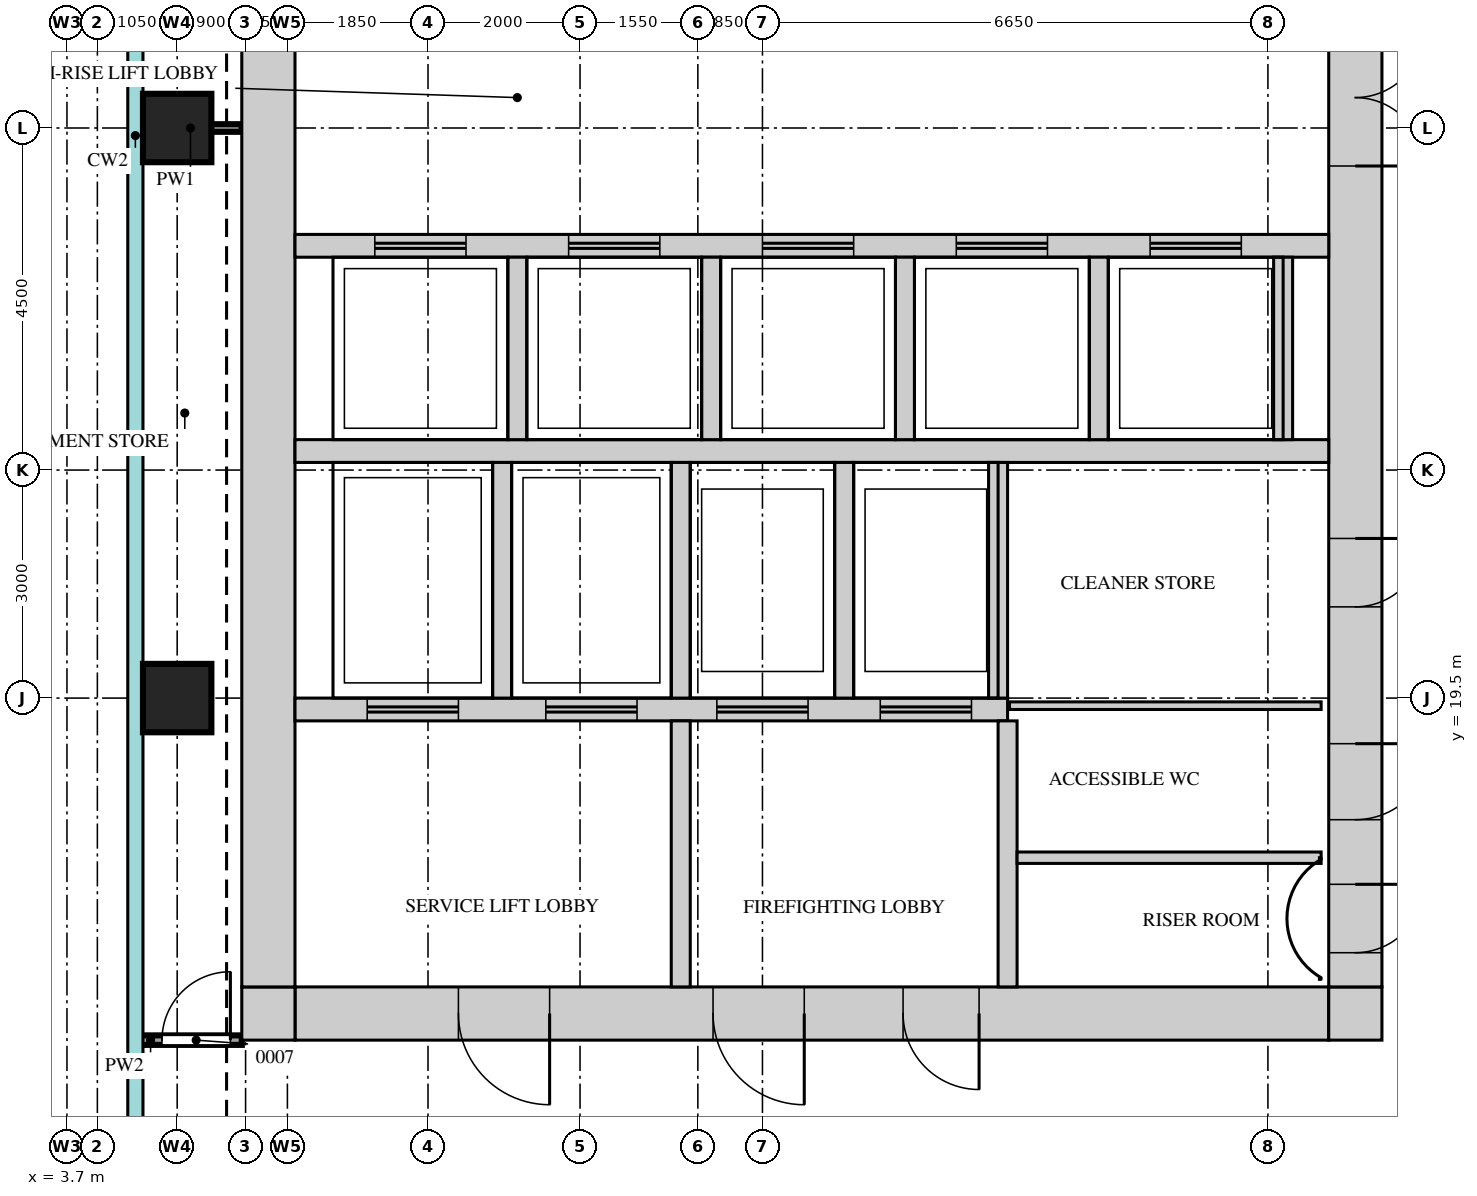
"""IFC4 building model, lengths in metres.
Left out: names, types, materials, properties, quantities, classifications, styles, units other than length and angle.
Written with IfcOpenShell. Run it as: python <this file> out.ifc"""

import sys

from ifc_helpers import new_model, si_unit, direction, frame, frame_2d, origin, origin_2d, place, context, subcontext, project, spatial, rectangle, extrude, source, transform, mapped, element, fill, save


model = new_model("IFC4")
c1 = context("Model", 3, precision=1e-05, world=origin(), true_north=direction((0.0, 1.0)))
c2 = subcontext(c1, "Body", "Model", "MODEL_VIEW")
j1 = project(units=[si_unit("LENGTHUNIT", "METRE"), si_unit("PLANEANGLEUNIT", "RADIAN")], contexts=[c1])
p1 = place(None, origin())
s1 = spatial("IfcSite", under=j1, at=p1, CompositionType="ELEMENT")
p2 = place(p1, origin())
s2 = spatial("IfcBuilding", under=s1, at=p2, CompositionType="ELEMENT")
p3 = place(p2, frame((0.0, 0.0, 242.2)))
s3 = spatial("IfcBuildingStorey", under=s2, at=p3, CompositionType="ELEMENT", Elevation=242.2)
m1 = source(origin(), c2, "Body", "SweptSolid", [
    extrude(rectangle(XDim=13.6, YDim=0.7, at=frame_2d((6.8, 0.0))), origin(), (0.0, 0.0, 1.0), 3.75),
])
p4 = place(p3, frame((6.7, 15.35, 0.0), z_axis=(0.0, 0.0, 1.0), x_axis=(1.0, 0.0, 0.0)))
e1 = element("IfcWall", 1, at=p4, inside=s3, PredefinedType="SHEAR", context=c2, shape_type="MappedRepresentation", body=[
    mapped(m1, transform((0.0, 0.0, 0.0))),
])
m2 = source(origin(), c2, "Body", "SweptSolid", [
    extrude(rectangle(XDim=1.2, YDim=2.1, at=frame_2d((0.6, 1.05))), frame((0.0, 0.36, 0.0), z_axis=(0.0, -1.0, 0.0), x_axis=(1.0, 0.0, 0.0)), (0.0, 0.0, 1.0), 0.72),
])
p5 = place(p4, frame((5.5, 0.0, 0.0)))
e2 = element("IfcOpeningElement", 2, at=p5, cuts=e1, PredefinedType="OPENING", context=c2, shape_type="MappedRepresentation", body=[
    mapped(m2, transform((0.0, 0.0, 0.0))),
])
p6 = place(p4, frame((2.15, 0.0, 0.0)))
e3 = element("IfcOpeningElement", 3, at=p6, cuts=e1, PredefinedType="OPENING", context=c2, shape_type="MappedRepresentation", body=[
    mapped(m2, transform((0.0, 0.0, 0.0))),
])
m3 = source(origin(), c2, "Body", "SweptSolid", [
    extrude(rectangle(XDim=1.0, YDim=2.1, at=frame_2d((0.5, 1.05))), frame((0.0, 0.36, 0.0), z_axis=(0.0, -1.0, 0.0), x_axis=(1.0, 0.0, 0.0)), (0.0, 0.0, 1.0), 0.72),
])
p7 = place(p4, frame((8.0, 0.0, 0.0)))
e4 = element("IfcOpeningElement", 4, at=p7, cuts=e1, PredefinedType="OPENING", context=c2, shape_type="MappedRepresentation", body=[
    mapped(m3, transform((0.0, 0.0, 0.0))),
])
m4 = source(origin(), c2, "Body", "SweptSolid", [
    extrude(rectangle(XDim=0.7, YDim=0.7, at=frame_2d((0.35, 0.0))), origin(), (0.0, 0.0, 1.0), 3.75),
])
for number, where, z_axis, x_axis in (
    (5, (20.3, 15.35, 0.0), (0.0, 0.0, 1.0), (1.0, 0.0, 0.0)),
    (6, (6.0, 15.35, 0.0), (0.0, 0.0, 1.0), (1.0, 0.0, 0.0)),
):
    element("IfcWall", number, at=place(p3, frame(where, z_axis=z_axis, x_axis=x_axis)), inside=s3, PredefinedType="SHEAR", context=c2, shape_type="MappedRepresentation", body=[
        mapped(m4, transform((0.0, 0.0, 0.0))),
    ])
m5 = source(origin(), c2, "Body", "SweptSolid", [
    extrude(rectangle(XDim=22.6, YDim=0.7, at=frame_2d((11.3, 0.0))), origin(), (0.0, 0.0, 1.0), 3.75),
])
p8 = place(p3, frame((20.65, 15.7, 0.0), z_axis=(0.0, 0.0, 1.0), x_axis=(0.0, 1.0, 0.0)))
e7 = element("IfcWall", 7, at=p8, inside=s3, PredefinedType="SHEAR", context=c2, shape_type="MappedRepresentation", body=[
    mapped(m5, transform((0.0, 0.0, 0.0))),
])
m6 = source(origin(), c2, "Body", "SweptSolid", [
    extrude(rectangle(XDim=1.8, YDim=2.1, at=frame_2d((0.9, 1.05))), frame((0.0, 0.36, 0.0), z_axis=(0.0, -1.0, 0.0), x_axis=(1.0, 0.0, 0.0)), (0.0, 0.0, 1.0), 0.72),
])
p9 = place(p8, frame((10.8, 0.0, 0.0)))
e8 = element("IfcOpeningElement", 8, at=p9, cuts=e7, PredefinedType="OPENING", context=c2, shape_type="MappedRepresentation", body=[
    mapped(m6, transform((0.0, 0.0, 0.0))),
])
m7 = source(origin(), c2, "Body", "SweptSolid", [
    extrude(rectangle(XDim=0.9, YDim=2.1, at=frame_2d((0.45, 1.05))), frame((0.0, 0.36, 0.0), z_axis=(0.0, -1.0, 0.0), x_axis=(1.0, 0.0, 0.0)), (0.0, 0.0, 1.0), 0.72),
])
p10 = place(p8, frame((0.45, 0.0, 0.0)))
e9 = element("IfcOpeningElement", 9, at=p10, cuts=e7, PredefinedType="OPENING", context=c2, shape_type="MappedRepresentation", body=[
    mapped(m7, transform((0.0, 0.0, 0.0))),
])
p11 = place(p8, frame((2.2, 0.0, 0.0)))
e10 = element("IfcOpeningElement", 10, at=p11, cuts=e7, PredefinedType="OPENING", context=c2, shape_type="MappedRepresentation", body=[
    mapped(m3, transform((0.0, 0.0, 0.0))),
])
p12 = place(p8, frame((5.0, 0.0, 0.0)))
e11 = element("IfcOpeningElement", 11, at=p12, cuts=e7, PredefinedType="OPENING", context=c2, shape_type="MappedRepresentation", body=[
    mapped(m7, transform((0.0, 0.0, 0.0))),
])
p13 = place(p3, frame((6.35, 15.7, 0.0), z_axis=(0.0, 0.0, 1.0), x_axis=(0.0, 1.0, 0.0)))
e12 = element("IfcWall", 12, at=p13, inside=s3, PredefinedType="SHEAR", context=c2, shape_type="MappedRepresentation", body=[
    mapped(m5, transform((0.0, 0.0, 0.0))),
])
m8 = source(origin(), c2, "Body", "SweptSolid", [
    extrude(rectangle(XDim=13.6, YDim=0.3, at=frame_2d((6.8, 0.0))), origin(), (0.0, 0.0, 1.0), 3.75),
])
p14 = place(p3, frame((6.7, 22.75, 0.0), z_axis=(0.0, 0.0, 1.0), x_axis=(1.0, 0.0, 0.0)))
e13 = element("IfcWall", 13, at=p14, inside=s3, PredefinedType="STANDARD", context=c2, shape_type="MappedRepresentation", body=[
    mapped(m8, transform((0.0, 0.0, 0.0))),
])
m9 = source(origin(), c2, "Body", "SweptSolid", [
    extrude(rectangle(XDim=9.375, YDim=0.3, at=frame_2d((4.688, 0.0))), origin(), (0.0, 0.0, 1.0), 3.75),
])
p15 = place(p3, frame((6.7, 19.35, 0.0), z_axis=(0.0, 0.0, 1.0), x_axis=(1.0, 0.0, 0.0)))
e14 = element("IfcWall", 14, at=p15, inside=s3, PredefinedType="STANDARD", context=c2, shape_type="MappedRepresentation", body=[
    mapped(m9, transform((0.0, 0.0, 0.0))),
])
m10 = source(origin(), c2, "Body", "SweptSolid", [
    extrude(rectangle(XDim=1.2, YDim=2.1, at=frame_2d((0.6, 1.05))), frame((0.0, 0.16, 0.0), z_axis=(0.0, -1.0, 0.0), x_axis=(1.0, 0.0, 0.0)), (0.0, 0.0, 1.0), 0.32),
])
p16 = place(p15, frame((0.95, 0.0, 0.0)))
e15 = element("IfcOpeningElement", 15, at=p16, cuts=e14, PredefinedType="OPENING", context=c2, shape_type="MappedRepresentation", body=[
    mapped(m10, transform((0.0, 0.0, 0.0))),
])
p17 = place(p15, frame((3.3, 0.0, 0.0)))
e16 = element("IfcOpeningElement", 16, at=p17, cuts=e14, PredefinedType="OPENING", context=c2, shape_type="MappedRepresentation", body=[
    mapped(m10, transform((0.0, 0.0, 0.0))),
])
p18 = place(p15, frame((5.55, 0.0, 0.0)))
e17 = element("IfcOpeningElement", 17, at=p18, cuts=e14, PredefinedType="OPENING", context=c2, shape_type="MappedRepresentation", body=[
    mapped(m10, transform((0.0, 0.0, 0.0))),
])
p19 = place(p15, frame((7.7, 0.0, 0.0)))
e18 = element("IfcOpeningElement", 18, at=p19, cuts=e14, PredefinedType="OPENING", context=c2, shape_type="MappedRepresentation", body=[
    mapped(m10, transform((0.0, 0.0, 0.0))),
])
p20 = place(p3, frame((6.7, 25.45, 0.0), z_axis=(0.0, 0.0, 1.0), x_axis=(1.0, 0.0, 0.0)))
e19 = element("IfcWall", 19, at=p20, inside=s3, PredefinedType="STANDARD", context=c2, shape_type="MappedRepresentation", body=[
    mapped(m8, transform((0.0, 0.0, 0.0))),
])
p21 = place(p20, frame((1.05, 0.0, 0.0)))
e20 = element("IfcOpeningElement", 20, at=p21, cuts=e19, PredefinedType="OPENING", context=c2, shape_type="MappedRepresentation", body=[
    mapped(m10, transform((0.0, 0.0, 0.0))),
])
p22 = place(p20, frame((3.6, 0.0, 0.0)))
e21 = element("IfcOpeningElement", 21, at=p22, cuts=e19, PredefinedType="OPENING", context=c2, shape_type="MappedRepresentation", body=[
    mapped(m10, transform((0.0, 0.0, 0.0))),
])
p23 = place(p20, frame((6.15, 0.0, 0.0)))
e22 = element("IfcOpeningElement", 22, at=p23, cuts=e19, PredefinedType="OPENING", context=c2, shape_type="MappedRepresentation", body=[
    mapped(m10, transform((0.0, 0.0, 0.0))),
])
p24 = place(p20, frame((8.7, 0.0, 0.0)))
e23 = element("IfcOpeningElement", 23, at=p24, cuts=e19, PredefinedType="OPENING", context=c2, shape_type="MappedRepresentation", body=[
    mapped(m10, transform((0.0, 0.0, 0.0))),
])
p25 = place(p20, frame((11.25, 0.0, 0.0)))
e24 = element("IfcOpeningElement", 24, at=p25, cuts=e19, PredefinedType="OPENING", context=c2, shape_type="MappedRepresentation", body=[
    mapped(m10, transform((0.0, 0.0, 0.0))),
])
m11 = source(origin(), c2, "Body", "SweptSolid", [
    extrude(rectangle(XDim=3.1, YDim=0.25, at=frame_2d((1.55, 0.0))), origin(), (0.0, 0.0, 1.0), 3.75),
])
for number, where, z_axis, x_axis in (
    (25, (9.425, 19.5, 0.0), (0.0, 0.0, 1.0), (0.0, 1.0, 0.0)),
    (26, (11.775, 19.5, 0.0), (0.0, 0.0, 1.0), (0.0, 1.0, 0.0)),
    (27, (13.925, 19.5, 0.0), (0.0, 0.0, 1.0), (0.0, 1.0, 0.0)),
    (28, (15.95, 19.5, 0.0), (0.0, 0.0, 1.0), (0.0, 1.0, 0.0)),
):
    element("IfcWall", number, at=place(p3, frame(where, z_axis=z_axis, x_axis=x_axis)), inside=s3, PredefinedType="STANDARD", context=c2, shape_type="MappedRepresentation", body=[
        mapped(m11, transform((0.0, 0.0, 0.0))),
    ])
m12 = source(origin(), c2, "Body", "SweptSolid", [
    extrude(rectangle(XDim=2.4, YDim=0.25, at=frame_2d((1.2, 0.0))), origin(), (0.0, 0.0, 1.0), 3.75),
])
for number, where, z_axis, x_axis in (
    (29, (17.275, 22.9, 0.0), (0.0, 0.0, 1.0), (0.0, 1.0, 0.0)),
    (30, (19.7, 22.9, 0.0), (0.0, 0.0, 1.0), (0.0, 1.0, 0.0)),
    (31, (9.625, 22.9, 0.0), (0.0, 0.0, 1.0), (0.0, 1.0, 0.0)),
    (32, (12.175, 22.9, 0.0), (0.0, 0.0, 1.0), (0.0, 1.0, 0.0)),
    (33, (14.725, 22.9, 0.0), (0.0, 0.0, 1.0), (0.0, 1.0, 0.0)),
):
    element("IfcWall", number, at=place(p3, frame(where, z_axis=z_axis, x_axis=x_axis)), inside=s3, PredefinedType="STANDARD", context=c2, shape_type="MappedRepresentation", body=[
        mapped(m12, transform((0.0, 0.0, 0.0))),
    ])
m13 = source(origin(), c2, "Body", "SweptSolid", [
    extrude(rectangle(XDim=3.5, YDim=0.25, at=frame_2d((1.75, 0.0))), origin(), (0.0, 0.0, 1.0), 3.75),
])
for number, where, z_axis, x_axis in (
    (34, (16.075, 15.7, 0.0), (0.0, 0.0, 1.0), (0.0, 1.0, 0.0)),
    (35, (11.775, 15.7, 0.0), (0.0, 0.0, 1.0), (0.0, 1.0, 0.0)),
):
    element("IfcWall", number, at=place(p3, frame(where, z_axis=z_axis, x_axis=x_axis)), inside=s3, PredefinedType="STANDARD", context=c2, shape_type="MappedRepresentation", body=[
        mapped(m13, transform((0.0, 0.0, 0.0))),
    ])
m14 = source(origin(), c2, "Body", "SweptSolid", [
    extrude(rectangle(XDim=0.9, YDim=0.9, at=origin_2d()), origin(), (0.0, 0.0, 1.0), 3.75),
])
for number, where, z_axis, x_axis in (
    (36, (5.15, 19.5, 0.0), (0.0, 0.0, 1.0), (1.0, 0.0, 0.0)),
    (37, (5.15, 27.0, 0.0), (0.0, 0.0, 1.0), (1.0, 0.0, 0.0)),
):
    element("IfcColumn", number, at=place(p3, frame(where, z_axis=z_axis, x_axis=x_axis)), inside=s3, PredefinedType="COLUMN", context=c2, shape_type="MappedRepresentation", body=[
        mapped(m14, transform((0.0, 0.0, 0.0))),
    ])
m15 = source(origin(), c2, "Body", "SweptSolid", [
    extrude(rectangle(XDim=1.35, YDim=0.125, at=frame_2d((0.675, 0.0))), origin(), (0.0, 0.0, 1.0), 3.8),
])
p26 = place(p3, frame((4.65, 15.0, 0.0), z_axis=(0.0, 0.0, 1.0), x_axis=(1.0, 0.0, 0.0)))
e38 = element("IfcWall", 38, at=p26, inside=s3, PredefinedType="PARTITIONING", context=c2, shape_type="MappedRepresentation", body=[
    mapped(m15, transform((0.0, 0.0, 0.0))),
])
m16 = source(origin(), c2, "Body", "SweptSolid", [
    extrude(rectangle(XDim=0.9, YDim=2.1, at=frame_2d((0.45, 1.05))), frame((0.0, 0.073, 0.0), z_axis=(0.0, -1.0, 0.0), x_axis=(1.0, 0.0, 0.0)), (0.0, 0.0, 1.0), 0.145),
])
p27 = place(p26, frame((0.3, 0.0, 0.0)))
e39 = element("IfcOpeningElement", 39, at=p27, cuts=e38, PredefinedType="OPENING", context=c2, shape_type="MappedRepresentation", body=[
    mapped(m16, transform((0.0, 0.0, 0.0))),
])
m17 = source(origin(), c2, "Body", "SweptSolid", [
    extrude(rectangle(XDim=4.0, YDim=0.15, at=frame_2d((2.0, 0.0))), origin(), (0.0, 0.0, 1.0), 3.8),
])
p28 = place(p3, frame((16.2, 17.4, 0.0), z_axis=(0.0, 0.0, 1.0), x_axis=(1.0, 0.0, 0.0)))
e40 = element("IfcWall", 40, at=p28, inside=s3, PredefinedType="PARTITIONING", context=c2, shape_type="MappedRepresentation", body=[
    mapped(m17, transform((0.0, 0.0, 0.0))),
])
m18 = source(origin(), c2, "Body", "SweptSolid", [
    extrude(rectangle(XDim=4.1, YDim=0.1, at=frame_2d((2.05, 0.0))), origin(), (0.0, 0.0, 1.0), 3.8),
])
p29 = place(p3, frame((16.1, 19.4, 0.0), z_axis=(0.0, 0.0, 1.0), x_axis=(1.0, 0.0, 0.0)))
e41 = element("IfcWall", 41, at=p29, inside=s3, PredefinedType="PARTITIONING", context=c2, shape_type="MappedRepresentation", body=[
    mapped(m18, transform((0.0, 0.0, 0.0))),
])
m19 = source(origin(), c2, "Body", "SweptSolid", [
    extrude(rectangle(XDim=1.35, YDim=0.1, at=frame_2d((0.675, 0.0))), origin(), (0.0, 0.0, 1.0), 3.8),
])
p30 = place(p3, frame((4.65, 27.0, 0.0), z_axis=(0.0, 0.0, 1.0), x_axis=(1.0, 0.0, 0.0)))
e42 = element("IfcWall", 42, at=p30, inside=s3, PredefinedType="PARTITIONING", context=c2, shape_type="MappedRepresentation", body=[
    mapped(m19, transform((0.0, 0.0, 0.0))),
])
m20 = source(origin(), c2, "Body", "SweptSolid", [
    extrude(rectangle(XDim=1.8, YDim=2.1, at=frame_2d((0.9, 1.05))), frame((0.0, 0.3, 0.0), z_axis=(0.0, -1.0, 0.0), x_axis=(1.0, 0.0, 0.0)), (0.0, 0.0, 1.0), 0.6),
])
p31 = place(p9, origin())
e43 = element("IfcDoor", 43, at=p31, inside=s3, OperationType="DOUBLE_DOOR_SINGLE_SWING", PredefinedType="DOOR", context=c2, shape_type="MappedRepresentation", body=[
    mapped(m20, transform((0.0, 0.0, 0.0))),
])
fill(e8, e43)
m21 = source(origin(), c2, "Body", "SweptSolid", [
    extrude(rectangle(XDim=0.9, YDim=2.1, at=frame_2d((0.45, 1.05))), frame((0.0, 0.3, 0.0), z_axis=(0.0, -1.0, 0.0), x_axis=(1.0, 0.0, 0.0)), (0.0, 0.0, 1.0), 0.6),
])
p32 = place(p10, origin())
e44 = element("IfcDoor", 44, at=p32, inside=s3, OperationType="SINGLE_SWING_RIGHT", PredefinedType="DOOR", context=c2, shape_type="MappedRepresentation", body=[
    mapped(m21, transform((0.0, 0.0, 0.0))),
])
fill(e9, e44)
m22 = source(origin(), c2, "Body", "SweptSolid", [
    extrude(rectangle(XDim=1.0, YDim=2.1, at=frame_2d((0.5, 1.05))), frame((0.0, 0.3, 0.0), z_axis=(0.0, -1.0, 0.0), x_axis=(1.0, 0.0, 0.0)), (0.0, 0.0, 1.0), 0.6),
])
p33 = place(p11, origin())
e45 = element("IfcDoor", 45, at=p33, inside=s3, OperationType="SINGLE_SWING_RIGHT", PredefinedType="DOOR", context=c2, shape_type="MappedRepresentation", body=[
    mapped(m22, transform((0.0, 0.0, 0.0))),
])
fill(e10, e45)
p34 = place(p12, origin())
e46 = element("IfcDoor", 46, at=p34, inside=s3, OperationType="SINGLE_SWING_RIGHT", PredefinedType="DOOR", context=c2, shape_type="MappedRepresentation", body=[
    mapped(m21, transform((0.0, 0.0, 0.0))),
])
fill(e11, e46)
m23 = source(origin(), c2, "Body", "SweptSolid", [
    extrude(rectangle(XDim=1.2, YDim=2.1, at=frame_2d((0.6, 1.05))), frame((0.0, 0.3, 0.0), z_axis=(0.0, -1.0, 0.0), x_axis=(1.0, 0.0, 0.0)), (0.0, 0.0, 1.0), 0.6),
])
p35 = place(p5, origin())
e47 = element("IfcDoor", 47, at=p35, inside=s3, OperationType="SINGLE_SWING_RIGHT", PredefinedType="DOOR", context=c2, shape_type="MappedRepresentation", body=[
    mapped(m23, transform((0.0, 0.0, 0.0))),
])
fill(e2, e47)
p36 = place(p6, origin())
e48 = element("IfcDoor", 48, at=p36, inside=s3, OperationType="SINGLE_SWING_RIGHT", PredefinedType="DOOR", context=c2, shape_type="MappedRepresentation", body=[
    mapped(m23, transform((0.0, 0.0, 0.0))),
])
fill(e3, e48)
p37 = place(p7, origin())
e49 = element("IfcDoor", 49, at=p37, inside=s3, OperationType="SINGLE_SWING_RIGHT", PredefinedType="DOOR", context=c2, shape_type="MappedRepresentation", body=[
    mapped(m22, transform((0.0, 0.0, 0.0))),
])
fill(e4, e49)
m24 = source(origin(), c2, "Body", "SweptSolid", [
    extrude(rectangle(XDim=0.9, YDim=2.1, at=frame_2d((0.45, 1.05))), frame((0.0, 0.025, 0.0), z_axis=(0.0, -1.0, 0.0), x_axis=(1.0, 0.0, 0.0)), (0.0, 0.0, 1.0), 0.05),
])
p38 = place(p27, origin())
e50 = element("IfcDoor", 50, at=p38, inside=s3, OperationType="SINGLE_SWING_LEFT", PredefinedType="DOOR", context=c2, shape_type="MappedRepresentation", body=[
    mapped(m24, transform((0.0, 0.0, 0.0))),
])
fill(e39, e50)
m25 = source(origin(), c2, "Body", "SweptSolid", [
    extrude(rectangle(XDim=1.2, YDim=2.1, at=frame_2d((0.6, 1.05))), frame((0.0, 0.025, 0.0), z_axis=(0.0, -1.0, 0.0), x_axis=(1.0, 0.0, 0.0)), (0.0, 0.0, 1.0), 0.05),
])
p39 = place(p21, origin())
e51 = element("IfcDoor", 51, at=p39, inside=s3, OperationType="DOUBLE_DOOR_SLIDING", PredefinedType="DOOR", context=c2, shape_type="MappedRepresentation", body=[
    mapped(m25, transform((0.0, 0.0, 0.0))),
])
fill(e20, e51)
p40 = place(p22, origin())
e52 = element("IfcDoor", 52, at=p40, inside=s3, OperationType="DOUBLE_DOOR_SLIDING", PredefinedType="DOOR", context=c2, shape_type="MappedRepresentation", body=[
    mapped(m25, transform((0.0, 0.0, 0.0))),
])
fill(e21, e52)
p41 = place(p23, origin())
e53 = element("IfcDoor", 53, at=p41, inside=s3, OperationType="DOUBLE_DOOR_SLIDING", PredefinedType="DOOR", context=c2, shape_type="MappedRepresentation", body=[
    mapped(m25, transform((0.0, 0.0, 0.0))),
])
fill(e22, e53)
p42 = place(p24, origin())
e54 = element("IfcDoor", 54, at=p42, inside=s3, OperationType="DOUBLE_DOOR_SLIDING", PredefinedType="DOOR", context=c2, shape_type="MappedRepresentation", body=[
    mapped(m25, transform((0.0, 0.0, 0.0))),
])
fill(e23, e54)
p43 = place(p25, origin())
e55 = element("IfcDoor", 55, at=p43, inside=s3, OperationType="DOUBLE_DOOR_SLIDING", PredefinedType="DOOR", context=c2, shape_type="MappedRepresentation", body=[
    mapped(m25, transform((0.0, 0.0, 0.0))),
])
fill(e24, e55)
p44 = place(p16, origin())
e56 = element("IfcDoor", 56, at=p44, inside=s3, OperationType="DOUBLE_DOOR_SLIDING", PredefinedType="DOOR", context=c2, shape_type="MappedRepresentation", body=[
    mapped(m25, transform((0.0, 0.0, 0.0))),
])
fill(e15, e56)
p45 = place(p17, origin())
e57 = element("IfcDoor", 57, at=p45, inside=s3, OperationType="DOUBLE_DOOR_SLIDING", PredefinedType="DOOR", context=c2, shape_type="MappedRepresentation", body=[
    mapped(m25, transform((0.0, 0.0, 0.0))),
])
fill(e16, e57)
p46 = place(p18, origin())
e58 = element("IfcDoor", 58, at=p46, inside=s3, OperationType="DOUBLE_DOOR_SLIDING", PredefinedType="DOOR", context=c2, shape_type="MappedRepresentation", body=[
    mapped(m25, transform((0.0, 0.0, 0.0))),
])
fill(e17, e58)
p47 = place(p19, origin())
e59 = element("IfcDoor", 59, at=p47, inside=s3, OperationType="DOUBLE_DOOR_SLIDING", PredefinedType="DOOR", context=c2, shape_type="MappedRepresentation", body=[
    mapped(m25, transform((0.0, 0.0, 0.0))),
])
fill(e18, e59)
save(model, sys.argv[1])
